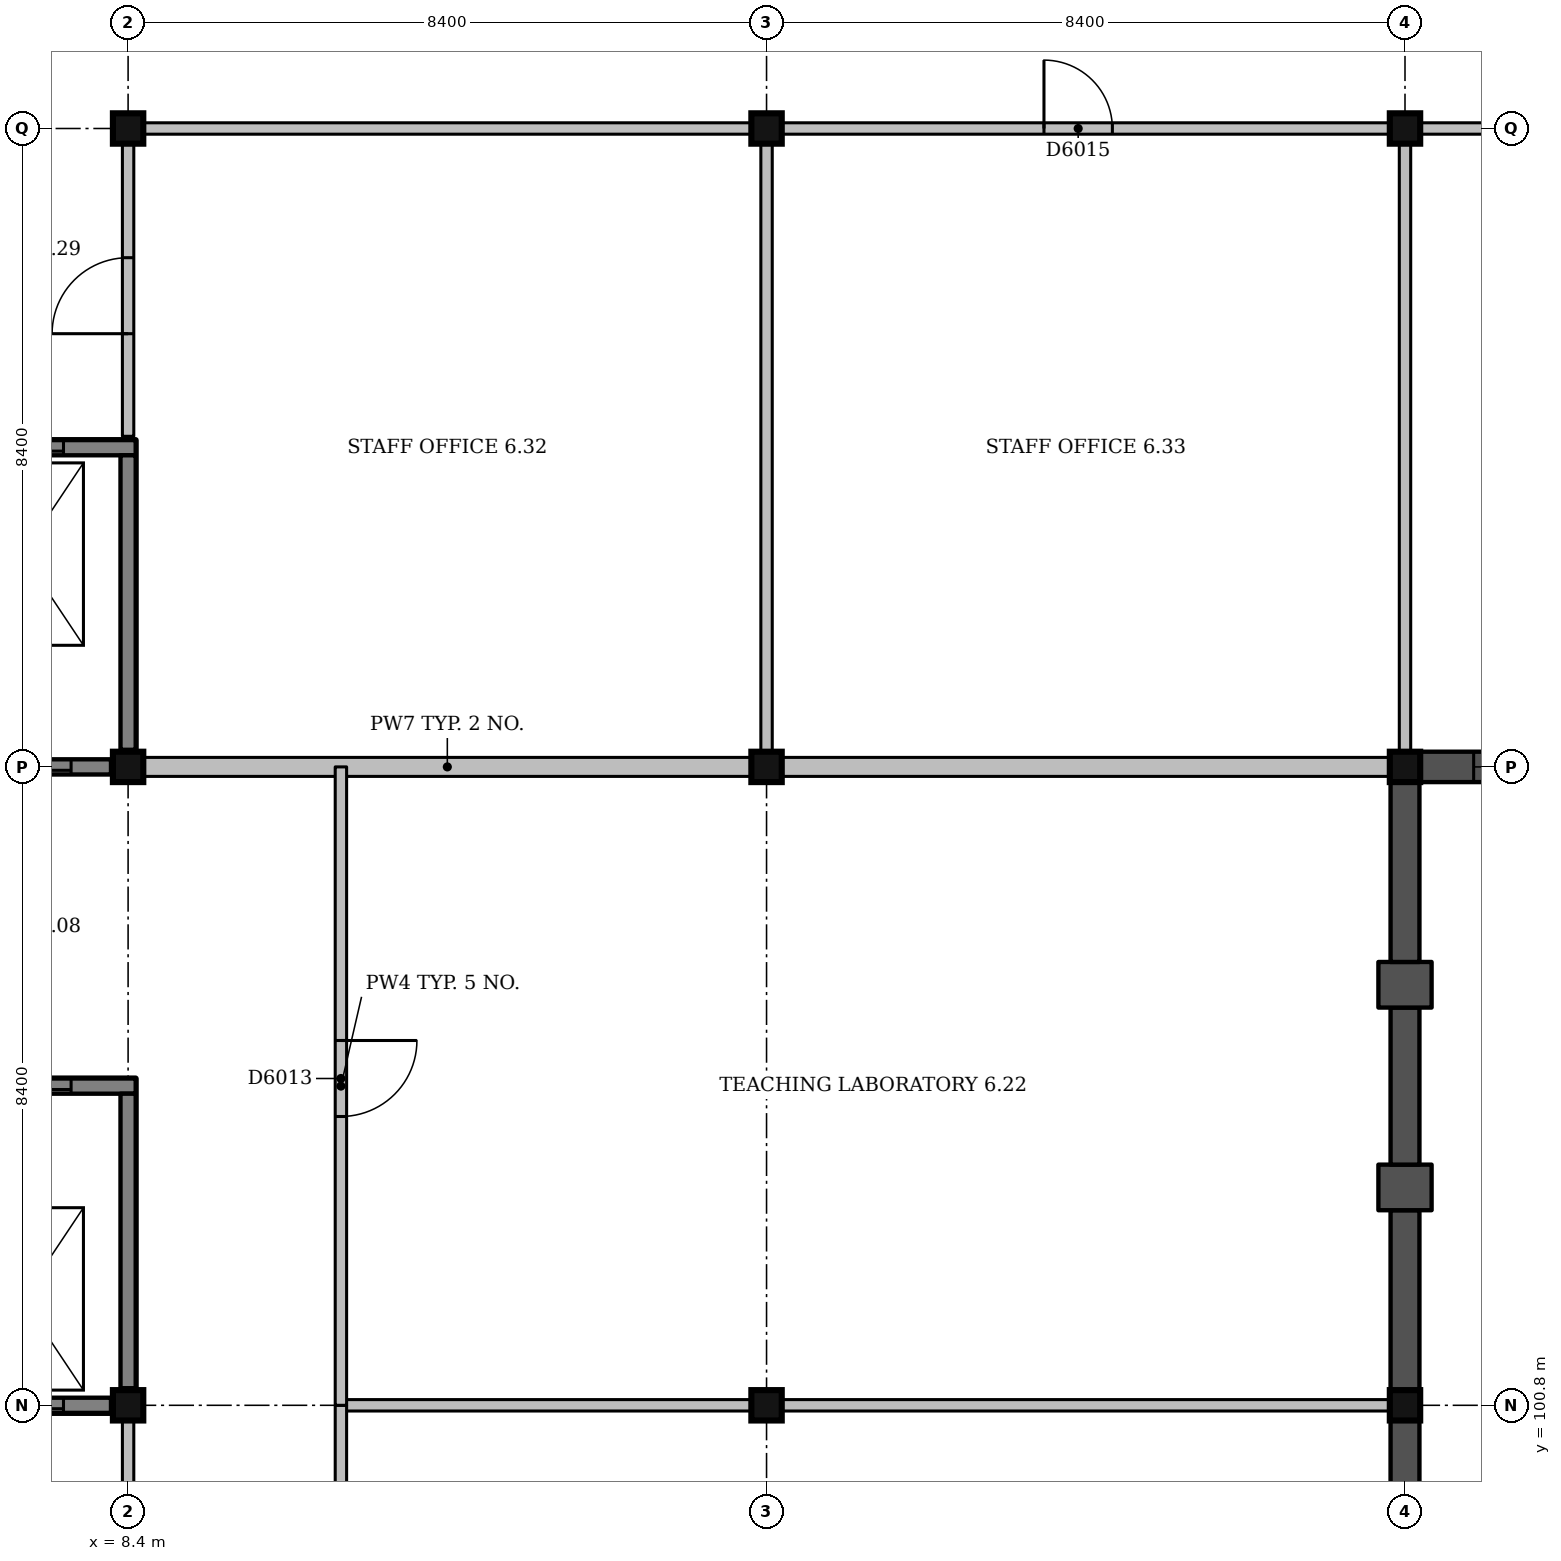
"""IFC4 building model, lengths in metres.
Left out: names, types, materials, properties, quantities, classifications, styles, units other than length and angle.
Written with IfcOpenShell. Run it as: python <this file> out.ifc"""

import sys

from ifc_helpers import new_model, si_unit, direction, frame, frame_2d, origin, origin_2d, place, context, subcontext, project, spatial, rectangle, extrude, element, fill, save


model = new_model("IFC4")
c1 = context("Model", 3, precision=1e-05, world=origin(), true_north=direction((0.0, 1.0)))
c2 = subcontext(c1, "Body", "Model", "MODEL_VIEW")
j1 = project(units=[si_unit("LENGTHUNIT", "METRE"), si_unit("PLANEANGLEUNIT", "RADIAN")], contexts=[c1])
p1 = place(None, origin())
s1 = spatial("IfcSite", under=j1, at=p1, CompositionType="ELEMENT")
p2 = place(p1, origin())
s2 = spatial("IfcBuilding", under=s1, at=p2, CompositionType="ELEMENT")
p3 = place(p2, frame((0.0, 0.0, 27.0)))
s3 = spatial("IfcBuildingStorey", under=s2, at=p3, CompositionType="ELEMENT", Elevation=27.0)
for number, where, z_axis, x_axis in (
    (1, (8.4, 100.8, 0.0), (0.0, 0.0, 1.0), (1.0, 0.0, 0.0)),
    (2, (8.4, 109.2, 0.0), (0.0, 0.0, 1.0), (1.0, 0.0, 0.0)),
    (3, (16.8, 100.8, 0.0), (0.0, 0.0, 1.0), (1.0, 0.0, 0.0)),
    (4, (16.8, 109.2, 0.0), (0.0, 0.0, 1.0), (1.0, 0.0, 0.0)),
    (5, (25.2, 100.8, 0.0), (0.0, 0.0, 1.0), (1.0, 0.0, 0.0)),
    (6, (25.2, 109.2, 0.0), (0.0, 0.0, 1.0), (1.0, 0.0, 0.0)),
    (7, (8.4, 117.6, 0.0), (0.0, 0.0, 1.0), (1.0, 0.0, 0.0)),
    (8, (16.8, 117.6, 0.0), (0.0, 0.0, 1.0), (1.0, 0.0, 0.0)),
    (9, (25.2, 117.6, 0.0), (0.0, 0.0, 1.0), (1.0, 0.0, 0.0)),
):
    element("IfcColumn", number, at=place(p3, frame(where, z_axis=z_axis, x_axis=x_axis)), inside=s3, PredefinedType="COLUMN", context=c2, shape_type="SweptSolid", body=[
        extrude(rectangle(XDim=0.4, YDim=0.4, at=origin_2d()), origin(), (0.0, 0.0, 1.0), 4.5),
    ])
p4 = place(p3, frame((5.5, 100.8, 0.0), z_axis=(0.0, 0.0, 1.0), x_axis=(1.0, 0.0, 0.0)))
e10 = element("IfcWall", 10, at=p4, inside=s3, PredefinedType="SHEAR", context=c2, shape_type="SweptSolid", body=[
    extrude(rectangle(XDim=2.675, YDim=0.2, at=frame_2d((1.337, 0.0))), origin(), (0.0, 0.0, 1.0), 4.5),
])
p5 = place(p4, frame((0.95, 0.0, 0.0)))
e11 = element("IfcOpeningElement", 11, at=p5, cuts=e10, PredefinedType="OPENING", context=c2, shape_type="SweptSolid", body=[
    extrude(rectangle(XDim=1.1, YDim=2.1, at=frame_2d((0.55, 1.05))), frame((0.0, 0.11, 0.0), z_axis=(0.0, -1.0, 0.0), x_axis=(1.0, 0.0, 0.0)), (0.0, 0.0, 1.0), 0.22),
])
p6 = place(p3, frame((5.5, 105.0, 0.0), z_axis=(0.0, 0.0, 1.0), x_axis=(1.0, 0.0, 0.0)))
e12 = element("IfcWall", 12, at=p6, inside=s3, PredefinedType="SHEAR", context=c2, shape_type="SweptSolid", body=[
    extrude(rectangle(XDim=3.0, YDim=0.2, at=frame_2d((1.5, 0.0))), origin(), (0.0, 0.0, 1.0), 4.5),
])
p7 = place(p6, frame((1.05, 0.0, 0.0)))
e13 = element("IfcOpeningElement", 13, at=p7, cuts=e12, PredefinedType="OPENING", context=c2, shape_type="SweptSolid", body=[
    extrude(rectangle(XDim=1.1, YDim=2.1, at=frame_2d((0.55, 1.05))), frame((0.0, 0.11, 0.0), z_axis=(0.0, -1.0, 0.0), x_axis=(1.0, 0.0, 0.0)), (0.0, 0.0, 1.0), 0.22),
])
p8 = place(p3, frame((8.4, 101.025, 0.0), z_axis=(0.0, 0.0, 1.0), x_axis=(0.0, 1.0, 0.0)))
e14 = element("IfcWall", 14, at=p8, inside=s3, PredefinedType="SHEAR", context=c2, shape_type="SweptSolid", body=[
    extrude(rectangle(XDim=3.875, YDim=0.2, at=frame_2d((1.938, 0.0))), origin(), (0.0, 0.0, 1.0), 4.5),
])
p9 = place(p3, frame((5.5, 109.2, 0.0), z_axis=(0.0, 0.0, 1.0), x_axis=(1.0, 0.0, 0.0)))
e15 = element("IfcWall", 15, at=p9, inside=s3, PredefinedType="SHEAR", context=c2, shape_type="SweptSolid", body=[
    extrude(rectangle(XDim=2.675, YDim=0.2, at=frame_2d((1.337, 0.0))), origin(), (0.0, 0.0, 1.0), 4.5),
])
p10 = place(p9, frame((1.05, 0.0, 0.0)))
e16 = element("IfcOpeningElement", 16, at=p10, cuts=e15, PredefinedType="OPENING", context=c2, shape_type="SweptSolid", body=[
    extrude(rectangle(XDim=1.1, YDim=2.1, at=frame_2d((0.55, 1.05))), frame((0.0, 0.11, 0.0), z_axis=(0.0, -1.0, 0.0), x_axis=(1.0, 0.0, 0.0)), (0.0, 0.0, 1.0), 0.22),
])
p11 = place(p3, frame((5.5, 113.4, 0.0), z_axis=(0.0, 0.0, 1.0), x_axis=(1.0, 0.0, 0.0)))
e17 = element("IfcWall", 17, at=p11, inside=s3, PredefinedType="SHEAR", context=c2, shape_type="SweptSolid", body=[
    extrude(rectangle(XDim=3.0, YDim=0.2, at=frame_2d((1.5, 0.0))), origin(), (0.0, 0.0, 1.0), 4.5),
])
p12 = place(p11, frame((0.95, 0.0, 0.0)))
e18 = element("IfcOpeningElement", 18, at=p12, cuts=e17, PredefinedType="OPENING", context=c2, shape_type="SweptSolid", body=[
    extrude(rectangle(XDim=1.1, YDim=2.1, at=frame_2d((0.55, 1.05))), frame((0.0, 0.11, 0.0), z_axis=(0.0, -1.0, 0.0), x_axis=(1.0, 0.0, 0.0)), (0.0, 0.0, 1.0), 0.22),
])
p13 = place(p3, frame((8.4, 109.425, 0.0), z_axis=(0.0, 0.0, 1.0), x_axis=(0.0, 1.0, 0.0)))
e19 = element("IfcWall", 19, at=p13, inside=s3, PredefinedType="SHEAR", context=c2, shape_type="SweptSolid", body=[
    extrude(rectangle(XDim=3.875, YDim=0.2, at=frame_2d((1.938, 0.0))), origin(), (0.0, 0.0, 1.0), 4.5),
])
p14 = place(p3, frame((25.2, 96.9, 0.0), z_axis=(0.0, 0.0, 1.0), x_axis=(0.0, 1.0, 0.0)))
e20 = element("IfcWall", 20, at=p14, inside=s3, PredefinedType="SOLIDWALL", context=c2, shape_type="SweptSolid", body=[
    extrude(rectangle(XDim=3.7, YDim=0.38, at=frame_2d((1.85, 0.0))), origin(), (0.0, 0.0, 1.0), 3.35),
])
p15 = place(p14, frame((1.25, 0.0, 0.9)))
e21 = element("IfcOpeningElement", 21, at=p15, cuts=e20, PredefinedType="OPENING", context=c2, shape_type="SweptSolid", body=[
    extrude(rectangle(XDim=1.2, YDim=2.1, at=frame_2d((0.6, 1.05))), frame((0.0, 0.2, 0.0), z_axis=(0.0, -1.0, 0.0), x_axis=(1.0, 0.0, 0.0)), (0.0, 0.0, 1.0), 0.4),
])
p16 = place(p3, frame((25.2, 101.0, 0.0), z_axis=(0.0, 0.0, 1.0), x_axis=(0.0, 1.0, 0.0)))
e22 = element("IfcWall", 22, at=p16, inside=s3, PredefinedType="SOLIDWALL", context=c2, shape_type="SweptSolid", body=[
    extrude(rectangle(XDim=2.367, YDim=0.38, at=frame_2d((1.183, 0.0))), origin(), (0.0, 0.0, 1.0), 3.35),
])
p17 = place(p3, frame((25.2, 103.367, 0.0), z_axis=(0.0, 0.0, 1.0), x_axis=(0.0, 1.0, 0.0)))
e23 = element("IfcWall", 23, at=p17, inside=s3, PredefinedType="SOLIDWALL", context=c2, shape_type="SweptSolid", body=[
    extrude(rectangle(XDim=0.6, YDim=0.7, at=frame_2d((0.3, 0.0))), origin(), (0.0, 0.0, 1.0), 3.35),
])
p18 = place(p3, frame((25.2, 103.967, 0.0), z_axis=(0.0, 0.0, 1.0), x_axis=(0.0, 1.0, 0.0)))
e24 = element("IfcWall", 24, at=p18, inside=s3, PredefinedType="SOLIDWALL", context=c2, shape_type="SweptSolid", body=[
    extrude(rectangle(XDim=2.066, YDim=0.38, at=frame_2d((1.033, 0.0))), origin(), (0.0, 0.0, 1.0), 3.35),
])
p19 = place(p3, frame((25.2, 106.033, 0.0), z_axis=(0.0, 0.0, 1.0), x_axis=(0.0, 1.0, 0.0)))
e25 = element("IfcWall", 25, at=p19, inside=s3, PredefinedType="SOLIDWALL", context=c2, shape_type="SweptSolid", body=[
    extrude(rectangle(XDim=0.6, YDim=0.7, at=frame_2d((0.3, 0.0))), origin(), (0.0, 0.0, 1.0), 3.35),
])
p20 = place(p3, frame((25.2, 106.633, 0.0), z_axis=(0.0, 0.0, 1.0), x_axis=(0.0, 1.0, 0.0)))
e26 = element("IfcWall", 26, at=p20, inside=s3, PredefinedType="SOLIDWALL", context=c2, shape_type="SweptSolid", body=[
    extrude(rectangle(XDim=2.367, YDim=0.38, at=frame_2d((1.183, 0.0))), origin(), (0.0, 0.0, 1.0), 3.35),
])
p21 = place(p3, frame((25.4, 109.2, 0.0), z_axis=(0.0, 0.0, 1.0), x_axis=(1.0, 0.0, 0.0)))
e27 = element("IfcWall", 27, at=p21, inside=s3, PredefinedType="SOLIDWALL", context=c2, shape_type="SweptSolid", body=[
    extrude(rectangle(XDim=2.607, YDim=0.4, at=frame_2d((1.303, 0.0))), origin(), (0.0, 0.0, 1.0), 4.2),
])
p22 = place(p21, frame((0.703, 0.0, 0.9)))
e28 = element("IfcOpeningElement", 28, at=p22, cuts=e27, PredefinedType="OPENING", context=c2, shape_type="SweptSolid", body=[
    extrude(rectangle(XDim=1.2, YDim=2.1, at=frame_2d((0.6, 1.05))), frame((0.0, 0.21, 0.0), z_axis=(0.0, -1.0, 0.0), x_axis=(1.0, 0.0, 0.0)), (0.0, 0.0, 1.0), 0.42),
])
p23 = place(p3, frame((11.2, 100.8, 0.0), z_axis=(0.0, 0.0, 1.0), x_axis=(1.0, 0.0, 0.0)))
e29 = element("IfcWall", 29, at=p23, inside=s3, PredefinedType="PARTITIONING", context=c2, shape_type="SweptSolid", body=[
    extrude(rectangle(XDim=5.4, YDim=0.15, at=frame_2d((2.7, 0.0))), origin(), (0.0, 0.0, 1.0), 3.4),
])
p24 = place(p3, frame((17.0, 100.8, 0.0), z_axis=(0.0, 0.0, 1.0), x_axis=(1.0, 0.0, 0.0)))
e30 = element("IfcWall", 30, at=p24, inside=s3, PredefinedType="PARTITIONING", context=c2, shape_type="SweptSolid", body=[
    extrude(rectangle(XDim=8.0, YDim=0.15, at=frame_2d((4.0, 0.0))), origin(), (0.0, 0.0, 1.0), 3.35),
])
p25 = place(p3, frame((8.6, 109.2, 0.0), z_axis=(0.0, 0.0, 1.0), x_axis=(1.0, 0.0, 0.0)))
e31 = element("IfcWall", 31, at=p25, inside=s3, PredefinedType="SOLIDWALL", context=c2, shape_type="SweptSolid", body=[
    extrude(rectangle(XDim=8.0, YDim=0.25, at=frame_2d((4.0, 0.0))), origin(), (0.0, 0.0, 1.0), 3.4),
])
p26 = place(p3, frame((17.0, 109.2, 0.0), z_axis=(0.0, 0.0, 1.0), x_axis=(1.0, 0.0, 0.0)))
e32 = element("IfcWall", 32, at=p26, inside=s3, PredefinedType="SOLIDWALL", context=c2, shape_type="SweptSolid", body=[
    extrude(rectangle(XDim=8.0, YDim=0.25, at=frame_2d((4.0, 0.0))), origin(), (0.0, 0.0, 1.0), 3.35),
])
p27 = place(p3, frame((8.6, 117.6, 0.0), z_axis=(0.0, 0.0, 1.0), x_axis=(1.0, 0.0, 0.0)))
e33 = element("IfcWall", 33, at=p27, inside=s3, PredefinedType="PARTITIONING", context=c2, shape_type="SweptSolid", body=[
    extrude(rectangle(XDim=8.0, YDim=0.15, at=frame_2d((4.0, 0.0))), origin(), (0.0, 0.0, 1.0), 3.4),
])
p28 = place(p3, frame((17.0, 117.6, 0.0), z_axis=(0.0, 0.0, 1.0), x_axis=(1.0, 0.0, 0.0)))
e34 = element("IfcWall", 34, at=p28, inside=s3, PredefinedType="PARTITIONING", context=c2, shape_type="SweptSolid", body=[
    extrude(rectangle(XDim=8.0, YDim=0.15, at=frame_2d((4.0, 0.0))), origin(), (0.0, 0.0, 1.0), 3.4),
])
p29 = place(p28, frame((3.45, 0.0, 0.0)))
e35 = element("IfcOpeningElement", 35, at=p29, cuts=e34, PredefinedType="OPENING", context=c2, shape_type="SweptSolid", body=[
    extrude(rectangle(XDim=0.9, YDim=2.1, at=frame_2d((0.45, 1.05))), frame((0.0, 0.085, 0.0), z_axis=(0.0, -1.0, 0.0), x_axis=(1.0, 0.0, 0.0)), (0.0, 0.0, 1.0), 0.17),
])
p30 = place(p3, frame((25.4, 117.6, 0.0), z_axis=(0.0, 0.0, 1.0), x_axis=(1.0, 0.0, 0.0)))
e36 = element("IfcWall", 36, at=p30, inside=s3, PredefinedType="PARTITIONING", context=c2, shape_type="SweptSolid", body=[
    extrude(rectangle(XDim=8.0, YDim=0.15, at=frame_2d((4.0, 0.0))), origin(), (0.0, 0.0, 1.0), 3.4),
])
p31 = place(p30, frame((3.45, 0.0, 0.0)))
e37 = element("IfcOpeningElement", 37, at=p31, cuts=e36, PredefinedType="OPENING", context=c2, shape_type="SweptSolid", body=[
    extrude(rectangle(XDim=0.9, YDim=2.1, at=frame_2d((0.45, 1.05))), frame((0.0, 0.085, 0.0), z_axis=(0.0, -1.0, 0.0), x_axis=(1.0, 0.0, 0.0)), (0.0, 0.0, 1.0), 0.17),
])
p32 = place(p3, frame((8.4, 92.6, 0.0), z_axis=(0.0, 0.0, 1.0), x_axis=(0.0, 1.0, 0.0)))
e38 = element("IfcWall", 38, at=p32, inside=s3, PredefinedType="PARTITIONING", context=c2, shape_type="SweptSolid", body=[
    extrude(rectangle(XDim=8.0, YDim=0.15, at=frame_2d((4.0, 0.0))), origin(), (0.0, 0.0, 1.0), 3.4),
])
p33 = place(p32, frame((3.45, 0.0, 0.0)))
e39 = element("IfcOpeningElement", 39, at=p33, cuts=e38, PredefinedType="OPENING", context=c2, shape_type="SweptSolid", body=[
    extrude(rectangle(XDim=1.0, YDim=2.1, at=frame_2d((0.5, 1.05))), frame((0.0, 0.085, 0.0), z_axis=(0.0, -1.0, 0.0), x_axis=(1.0, 0.0, 0.0)), (0.0, 0.0, 1.0), 0.17),
])
p34 = place(p3, frame((8.4, 113.55, 0.0), z_axis=(0.0, 0.0, 1.0), x_axis=(0.0, 1.0, 0.0)))
e40 = element("IfcWall", 40, at=p34, inside=s3, PredefinedType="PARTITIONING", context=c2, shape_type="SweptSolid", body=[
    extrude(rectangle(XDim=3.85, YDim=0.15, at=frame_2d((1.925, 0.0))), origin(), (0.0, 0.0, 1.0), 3.4),
])
p35 = place(p34, frame((1.35, 0.0, 0.0)))
e41 = element("IfcOpeningElement", 41, at=p35, cuts=e40, PredefinedType="OPENING", context=c2, shape_type="SweptSolid", body=[
    extrude(rectangle(XDim=1.0, YDim=2.1, at=frame_2d((0.5, 1.05))), frame((0.0, 0.085, 0.0), z_axis=(0.0, -1.0, 0.0), x_axis=(1.0, 0.0, 0.0)), (0.0, 0.0, 1.0), 0.17),
])
p36 = place(p3, frame((11.2, 84.0, 0.0), z_axis=(0.0, 0.0, 1.0), x_axis=(0.0, 1.0, 0.0)))
e42 = element("IfcWall", 42, at=p36, inside=s3, PredefinedType="PARTITIONING", context=c2, shape_type="SweptSolid", body=[
    extrude(rectangle(XDim=16.8, YDim=0.15, at=frame_2d((8.4, 0.0))), origin(), (0.0, 0.0, 1.0), 3.4),
])
p37 = place(p36, frame((1.7, 0.0, 0.0)))
e43 = element("IfcOpeningElement", 43, at=p37, cuts=e42, PredefinedType="OPENING", context=c2, shape_type="SweptSolid", body=[
    extrude(rectangle(XDim=0.9, YDim=2.1, at=frame_2d((0.45, 1.05))), frame((0.0, 0.085, 0.0), z_axis=(0.0, -1.0, 0.0), x_axis=(1.0, 0.0, 0.0)), (0.0, 0.0, 1.0), 0.17),
])
p38 = place(p36, frame((5.9, 0.0, 0.0)))
e44 = element("IfcOpeningElement", 44, at=p38, cuts=e42, PredefinedType="OPENING", context=c2, shape_type="SweptSolid", body=[
    extrude(rectangle(XDim=0.9, YDim=2.1, at=frame_2d((0.45, 1.05))), frame((0.0, 0.085, 0.0), z_axis=(0.0, -1.0, 0.0), x_axis=(1.0, 0.0, 0.0)), (0.0, 0.0, 1.0), 0.17),
])
p39 = place(p36, frame((12.2, 0.0, 0.0)))
e45 = element("IfcOpeningElement", 45, at=p39, cuts=e42, PredefinedType="OPENING", context=c2, shape_type="SweptSolid", body=[
    extrude(rectangle(XDim=0.9, YDim=2.1, at=frame_2d((0.45, 1.05))), frame((0.0, 0.085, 0.0), z_axis=(0.0, -1.0, 0.0), x_axis=(1.0, 0.0, 0.0)), (0.0, 0.0, 1.0), 0.17),
])
p40 = place(p3, frame((11.2, 100.8, 0.0), z_axis=(0.0, 0.0, 1.0), x_axis=(0.0, 1.0, 0.0)))
e46 = element("IfcWall", 46, at=p40, inside=s3, PredefinedType="PARTITIONING", context=c2, shape_type="SweptSolid", body=[
    extrude(rectangle(XDim=8.4, YDim=0.15, at=frame_2d((4.2, 0.0))), origin(), (0.0, 0.0, 1.0), 3.4),
])
p41 = place(p40, frame((3.8, 0.0, 0.0)))
e47 = element("IfcOpeningElement", 47, at=p41, cuts=e46, PredefinedType="OPENING", context=c2, shape_type="SweptSolid", body=[
    extrude(rectangle(XDim=1.0, YDim=2.1, at=frame_2d((0.5, 1.05))), frame((0.0, 0.085, 0.0), z_axis=(0.0, -1.0, 0.0), x_axis=(1.0, 0.0, 0.0)), (0.0, 0.0, 1.0), 0.17),
])
for number, where, z_axis, x_axis in (
    (48, (16.8, 109.4, 0.0), (0.0, 0.0, 1.0), (0.0, 1.0, 0.0)),
    (49, (25.2, 109.4, 0.0), (0.0, 0.0, 1.0), (0.0, 1.0, 0.0)),
):
    element("IfcWall", number, at=place(p3, frame(where, z_axis=z_axis, x_axis=x_axis)), inside=s3, PredefinedType="PARTITIONING", context=c2, shape_type="SweptSolid", body=[
        extrude(rectangle(XDim=8.0, YDim=0.15, at=frame_2d((4.0, 0.0))), origin(), (0.0, 0.0, 1.0), 3.35),
    ])
p42 = place(p22, origin())
e50 = element("IfcWindow", 50, at=p42, inside=s3, PartitioningType="SINGLE_PANEL", PredefinedType="WINDOW", context=c2, shape_type="SweptSolid", body=[
    extrude(rectangle(XDim=1.2, YDim=2.1, at=frame_2d((0.6, 1.05))), frame((0.0, 0.16, 0.0), z_axis=(0.0, -1.0, 0.0), x_axis=(1.0, 0.0, 0.0)), (0.0, 0.0, 1.0), 0.06),
])
fill(e28, e50)
p43 = place(p41, origin())
e51 = element("IfcDoor", 51, at=p43, inside=s3, OperationType="SINGLE_SWING_RIGHT", PredefinedType="DOOR", context=c2, shape_type="SweptSolid", body=[
    extrude(rectangle(XDim=1.0, YDim=2.1, at=frame_2d((0.5, 1.05))), frame((0.0, 0.025, 0.0), z_axis=(0.0, -1.0, 0.0), x_axis=(1.0, 0.0, 0.0)), (0.0, 0.0, 1.0), 0.05),
])
fill(e47, e51)
p44 = place(p35, origin())
e52 = element("IfcDoor", 52, at=p44, inside=s3, OperationType="SINGLE_SWING_LEFT", PredefinedType="DOOR", context=c2, shape_type="SweptSolid", body=[
    extrude(rectangle(XDim=1.0, YDim=2.1, at=frame_2d((0.5, 1.05))), frame((0.0, 0.025, 0.0), z_axis=(0.0, -1.0, 0.0), x_axis=(1.0, 0.0, 0.0)), (0.0, 0.0, 1.0), 0.05),
])
fill(e41, e52)
p45 = place(p29, origin())
e53 = element("IfcDoor", 53, at=p45, inside=s3, OperationType="SINGLE_SWING_LEFT", PredefinedType="DOOR", context=c2, shape_type="SweptSolid", body=[
    extrude(rectangle(XDim=0.9, YDim=2.1, at=frame_2d((0.45, 1.05))), frame((0.0, 0.025, 0.0), z_axis=(0.0, -1.0, 0.0), x_axis=(1.0, 0.0, 0.0)), (0.0, 0.0, 1.0), 0.05),
])
fill(e35, e53)
p46 = place(p5, origin())
e54 = element("IfcDoor", 54, at=p46, inside=s3, OperationType="SLIDING_TO_RIGHT", PredefinedType="DOOR", context=c2, shape_type="SweptSolid", body=[
    extrude(rectangle(XDim=1.1, YDim=2.1, at=frame_2d((0.55, 1.05))), frame((0.0, 0.025, 0.0), z_axis=(0.0, -1.0, 0.0), x_axis=(1.0, 0.0, 0.0)), (0.0, 0.0, 1.0), 0.05),
])
fill(e11, e54)
p47 = place(p7, origin())
e55 = element("IfcDoor", 55, at=p47, inside=s3, OperationType="SLIDING_TO_LEFT", PredefinedType="DOOR", context=c2, shape_type="SweptSolid", body=[
    extrude(rectangle(XDim=1.1, YDim=2.1, at=frame_2d((0.55, 1.05))), frame((0.0, 0.025, 0.0), z_axis=(0.0, -1.0, 0.0), x_axis=(1.0, 0.0, 0.0)), (0.0, 0.0, 1.0), 0.05),
])
fill(e13, e55)
p48 = place(p10, origin())
e56 = element("IfcDoor", 56, at=p48, inside=s3, OperationType="SLIDING_TO_RIGHT", PredefinedType="DOOR", context=c2, shape_type="SweptSolid", body=[
    extrude(rectangle(XDim=1.1, YDim=2.1, at=frame_2d((0.55, 1.05))), frame((0.0, 0.025, 0.0), z_axis=(0.0, -1.0, 0.0), x_axis=(1.0, 0.0, 0.0)), (0.0, 0.0, 1.0), 0.05),
])
fill(e16, e56)
p49 = place(p12, origin())
e57 = element("IfcDoor", 57, at=p49, inside=s3, OperationType="SLIDING_TO_LEFT", PredefinedType="DOOR", context=c2, shape_type="SweptSolid", body=[
    extrude(rectangle(XDim=1.1, YDim=2.1, at=frame_2d((0.55, 1.05))), frame((0.0, 0.025, 0.0), z_axis=(0.0, -1.0, 0.0), x_axis=(1.0, 0.0, 0.0)), (0.0, 0.0, 1.0), 0.05),
])
fill(e18, e57)
save(model, sys.argv[1])
